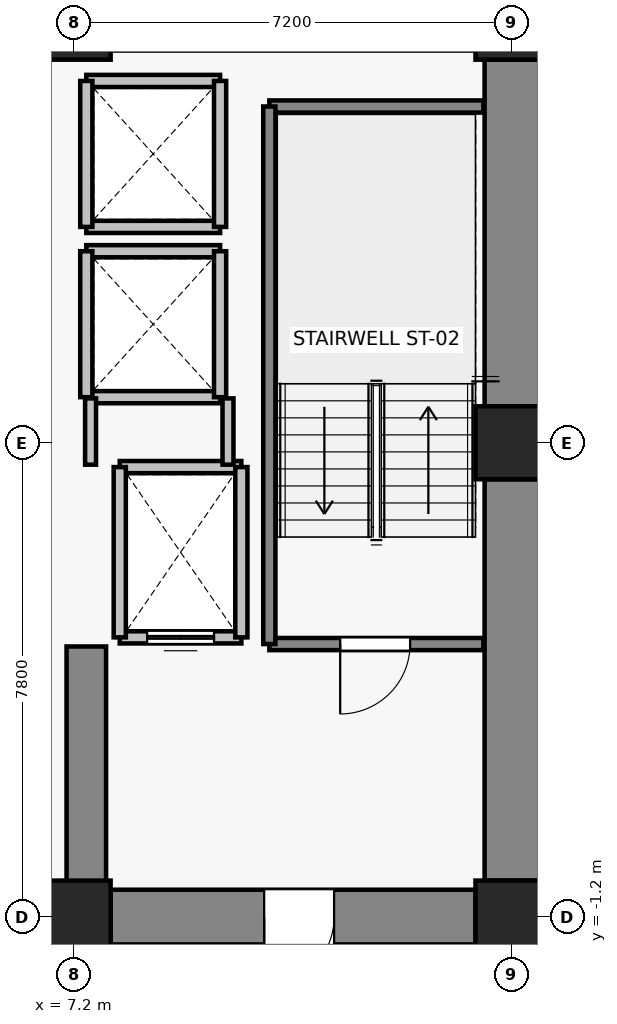
"""IFC4 building model, lengths in metres.
Left out: names, types, materials, properties, quantities, classifications, styles, units other than length and angle.
Written with IfcOpenShell. Run it as: python <this file> out.ifc"""

import sys

from ifc_helpers import new_model, si_unit, direction, frame, frame_2d, origin, origin_2d, place, context, subcontext, project, spatial, rectangle, extrude, source, transform, mapped, element, fill, save


model = new_model("IFC4")
c1 = context("Model", 3, precision=1e-05, world=origin(), true_north=direction((0.0, 1.0)))
c2 = subcontext(c1, "Body", "Model", "MODEL_VIEW")
j1 = project(units=[si_unit("LENGTHUNIT", "METRE"), si_unit("PLANEANGLEUNIT", "RADIAN")], contexts=[c1])
p1 = place(None, origin())
s1 = spatial("IfcSite", under=j1, at=p1, CompositionType="ELEMENT")
p2 = place(p1, origin())
s2 = spatial("IfcBuilding", under=s1, at=p2, CompositionType="ELEMENT")
p3 = place(p2, frame((0.0, 0.0, 70.3)))
s3 = spatial("IfcBuildingStorey", under=s2, at=p3, CompositionType="ELEMENT", Elevation=70.3)
for number, where, z_axis, x_axis in (
    (1, (7.2, -1.2, 0.0), (0.0, 0.0, 1.0), (1.0, 0.0, 0.0)),
    (2, (14.4, -1.2, 0.0), (0.0, 0.0, 1.0), (1.0, 0.0, 0.0)),
    (3, (14.4, 6.6, 0.0), (0.0, 0.0, 1.0), (1.0, 0.0, 0.0)),
    (4, (7.2, 13.5, 0.0), (0.0, 0.0, 1.0), (1.0, 0.0, 0.0)),
    (5, (14.4, 13.5, 0.0), (0.0, 0.0, 1.0), (1.0, 0.0, 0.0)),
):
    element("IfcColumn", number, at=place(p3, frame(where, z_axis=z_axis, x_axis=x_axis)), inside=s3, PredefinedType="COLUMN", context=c2, shape_type="SweptSolid", body=[
        extrude(rectangle(XDim=1.2, YDim=1.2, at=origin_2d()), origin(), (0.0, 0.0, 1.0), 3.3),
    ])
p4 = place(p3, frame((14.4, -0.6, 0.0), z_axis=(0.0, 0.0, 1.0), x_axis=(0.0, 1.0, 0.0)))
e6 = element("IfcWall", 6, at=p4, inside=s3, PredefinedType="SHEAR", context=c2, shape_type="SweptSolid", body=[
    extrude(rectangle(XDim=6.6, YDim=0.9, at=frame_2d((3.3, 0.0))), origin(), (0.0, 0.0, 1.0), 3.075),
])
p5 = place(p3, frame((14.4, 7.2, 0.0), z_axis=(0.0, 0.0, 1.0), x_axis=(0.0, 1.0, 0.0)))
e7 = element("IfcWall", 7, at=p5, inside=s3, PredefinedType="SHEAR", context=c2, shape_type="SweptSolid", body=[
    extrude(rectangle(XDim=5.7, YDim=0.9, at=frame_2d((2.85, 0.0))), origin(), (0.0, 0.0, 1.0), 3.075),
])
p6 = place(p3, frame((13.8, -1.2, 0.0), z_axis=(0.0, 0.0, 1.0), x_axis=(-1.0, 0.0, 0.0)))
e8 = element("IfcWall", 8, at=p6, inside=s3, PredefinedType="SHEAR", context=c2, shape_type="SweptSolid", body=[
    extrude(rectangle(XDim=6.0, YDim=0.9, at=frame_2d((3.0, 0.0))), origin(), (0.0, 0.0, 1.0), 3.075),
])
p7 = place(p6, frame((2.325, 0.0, 0.0)))
e9 = element("IfcOpeningElement", 9, at=p7, cuts=e8, PredefinedType="OPENING", context=c2, shape_type="SweptSolid", body=[
    extrude(rectangle(XDim=1.15, YDim=2.15, at=frame_2d((0.575, 1.075))), frame((0.0, 0.46, 0.0), z_axis=(0.0, -1.0, 0.0), x_axis=(1.0, 0.0, 0.0)), (0.0, 0.0, 1.0), 0.92),
])
p8 = place(p3, frame((7.4, -0.75, 0.0), z_axis=(0.0, 0.0, 1.0), x_axis=(0.0, 1.0, 0.0)))
e10 = element("IfcWall", 10, at=p8, inside=s3, PredefinedType="SHEAR", context=c2, shape_type="SweptSolid", body=[
    extrude(rectangle(XDim=4.0, YDim=0.65, at=frame_2d((2.0, 0.0))), origin(), (0.0, 0.0, 1.0), 3.075),
])
p9 = place(p3, frame((9.95, 3.4, 0.0), z_axis=(0.0, 0.0, 1.0), x_axis=(-1.0, 0.0, 0.0)))
e11 = element("IfcWall", 11, at=p9, inside=s3, PredefinedType="SOLIDWALL", context=c2, shape_type="SweptSolid", body=[
    extrude(rectangle(XDim=2.0, YDim=0.2, at=frame_2d((1.0, 0.0))), origin(), (0.0, 0.0, 1.0), 3.075),
])
p10 = place(p9, frame((0.45, 0.0, 0.0)))
e12 = element("IfcOpeningElement", 12, at=p10, cuts=e11, PredefinedType="OPENING", context=c2, shape_type="SweptSolid", body=[
    extrude(rectangle(XDim=1.1, YDim=2.2, at=frame_2d((0.55, 1.1))), frame((0.0, 0.11, 0.0), z_axis=(0.0, -1.0, 0.0), x_axis=(1.0, 0.0, 0.0)), (0.0, 0.0, 1.0), 0.22),
])
p11 = place(p3, frame((7.95, 6.2, 0.0), z_axis=(0.0, 0.0, 1.0), x_axis=(1.0, 0.0, 0.0)))
e13 = element("IfcWall", 13, at=p11, inside=s3, PredefinedType="SOLIDWALL", context=c2, shape_type="SweptSolid", body=[
    extrude(rectangle(XDim=2.0, YDim=0.2, at=frame_2d((1.0, 0.0))), origin(), (0.0, 0.0, 1.0), 3.075),
])
for number, where, z_axis, x_axis in (
    (14, (7.95, 3.4, 0.0), (0.0, 0.0, 1.0), (0.0, 1.0, 0.0)),
    (15, (9.95, 6.2, 0.0), (0.0, 0.0, 1.0), (0.0, -1.0, 0.0)),
):
    element("IfcWall", number, at=place(p3, frame(where, z_axis=z_axis, x_axis=x_axis)), inside=s3, PredefinedType="SOLIDWALL", context=c2, shape_type="SweptSolid", body=[
        extrude(rectangle(XDim=2.8, YDim=0.2, at=frame_2d((1.4, 0.0))), origin(), (0.0, 0.0, 1.0), 3.075),
    ])
for number, where, z_axis, x_axis in (
    (16, (9.6, 7.35, 0.0), (0.0, 0.0, 1.0), (-1.0, 0.0, 0.0)),
    (17, (7.4, 9.75, 0.0), (0.0, 0.0, 1.0), (1.0, 0.0, 0.0)),
):
    element("IfcWall", number, at=place(p3, frame(where, z_axis=z_axis, x_axis=x_axis)), inside=s3, PredefinedType="SOLIDWALL", context=c2, shape_type="SweptSolid", body=[
        extrude(rectangle(XDim=2.2, YDim=0.2, at=frame_2d((1.1, 0.0))), origin(), (0.0, 0.0, 1.0), 2.465),
    ])
p12 = place(p3, frame((7.4, 7.35, 0.0), z_axis=(0.0, 0.0, 1.0), x_axis=(0.0, 1.0, 0.0)))
e18 = element("IfcWall", 18, at=p12, inside=s3, PredefinedType="SOLIDWALL", context=c2, shape_type="SweptSolid", body=[
    extrude(rectangle(XDim=2.4, YDim=0.2, at=frame_2d((1.2, 0.0))), origin(), (0.0, 0.0, 1.0), 2.465),
])
p13 = place(p3, frame((9.6, 9.75, 0.0), z_axis=(0.0, 0.0, 1.0), x_axis=(0.0, -1.0, 0.0)))
e19 = element("IfcWall", 19, at=p13, inside=s3, PredefinedType="SOLIDWALL", context=c2, shape_type="SweptSolid", body=[
    extrude(rectangle(XDim=2.4, YDim=0.2, at=frame_2d((1.2, 0.0))), origin(), (0.0, 0.0, 1.0), 3.075),
])
for number, where, z_axis, x_axis in (
    (20, (9.6, 10.15, 0.0), (0.0, 0.0, 1.0), (-1.0, 0.0, 0.0)),
    (21, (7.4, 12.55, 0.0), (0.0, 0.0, 1.0), (1.0, 0.0, 0.0)),
):
    element("IfcWall", number, at=place(p3, frame(where, z_axis=z_axis, x_axis=x_axis)), inside=s3, PredefinedType="SOLIDWALL", context=c2, shape_type="SweptSolid", body=[
        extrude(rectangle(XDim=2.2, YDim=0.2, at=frame_2d((1.1, 0.0))), origin(), (0.0, 0.0, 1.0), 2.465),
    ])
p14 = place(p3, frame((7.4, 10.15, 0.0), z_axis=(0.0, 0.0, 1.0), x_axis=(0.0, 1.0, 0.0)))
e22 = element("IfcWall", 22, at=p14, inside=s3, PredefinedType="SOLIDWALL", context=c2, shape_type="SweptSolid", body=[
    extrude(rectangle(XDim=2.4, YDim=0.2, at=frame_2d((1.2, 0.0))), origin(), (0.0, 0.0, 1.0), 2.465),
])
p15 = place(p3, frame((9.6, 12.55, 0.0), z_axis=(0.0, 0.0, 1.0), x_axis=(0.0, -1.0, 0.0)))
e23 = element("IfcWall", 23, at=p15, inside=s3, PredefinedType="SOLIDWALL", context=c2, shape_type="SweptSolid", body=[
    extrude(rectangle(XDim=2.4, YDim=0.2, at=frame_2d((1.2, 0.0))), origin(), (0.0, 0.0, 1.0), 3.075),
])
p16 = place(p3, frame((13.93, 3.29, 0.0), z_axis=(0.0, 0.0, 1.0), x_axis=(-1.0, 0.0, 0.0)))
e24 = element("IfcWall", 24, at=p16, inside=s3, PredefinedType="SOLIDWALL", context=c2, shape_type="SweptSolid", body=[
    extrude(rectangle(XDim=3.52, YDim=0.2, at=frame_2d((1.76, 0.0))), origin(), (0.0, 0.0, 1.0), 3.075),
])
p17 = place(p16, frame((1.205, 0.0, 0.0)))
e25 = element("IfcOpeningElement", 25, at=p17, cuts=e24, PredefinedType="OPENING", context=c2, shape_type="SweptSolid", body=[
    extrude(rectangle(XDim=1.15, YDim=2.15, at=frame_2d((0.575, 1.075))), frame((0.0, 0.11, 0.0), z_axis=(0.0, -1.0, 0.0), x_axis=(1.0, 0.0, 0.0)), (0.0, 0.0, 1.0), 0.22),
])
p18 = place(p3, frame((10.41, 12.13, 0.0), z_axis=(0.0, 0.0, 1.0), x_axis=(1.0, 0.0, 0.0)))
e26 = element("IfcWall", 26, at=p18, inside=s3, PredefinedType="SOLIDWALL", context=c2, shape_type="SweptSolid", body=[
    extrude(rectangle(XDim=3.52, YDim=0.2, at=frame_2d((1.76, 0.0))), origin(), (0.0, 0.0, 1.0), 3.075),
])
p19 = place(p3, frame((10.41, 3.29, 0.0), z_axis=(0.0, 0.0, 1.0), x_axis=(0.0, 1.0, 0.0)))
e27 = element("IfcWall", 27, at=p19, inside=s3, PredefinedType="SOLIDWALL", context=c2, shape_type="SweptSolid", body=[
    extrude(rectangle(XDim=8.84, YDim=0.2, at=frame_2d((4.42, 0.0))), origin(), (0.0, 0.0, 1.0), 3.075),
])
p20 = place(p3, frame((7.47, 6.24, 0.0), z_axis=(0.0, 0.0, 1.0), x_axis=(0.0, 1.0, 0.0)))
e28 = element("IfcWall", 28, at=p20, inside=s3, PredefinedType="PARTITIONING", context=c2, shape_type="SweptSolid", body=[
    extrude(rectangle(XDim=1.09, YDim=0.18, at=frame_2d((0.545, 0.0))), origin(), (0.0, 0.0, 1.0), 2.465),
])
p21 = place(p3, frame((9.73, 7.33, 0.0), z_axis=(0.0, 0.0, 1.0), x_axis=(0.0, -1.0, 0.0)))
e29 = element("IfcWall", 29, at=p21, inside=s3, PredefinedType="PARTITIONING", context=c2, shape_type="SweptSolid", body=[
    extrude(rectangle(XDim=1.09, YDim=0.18, at=frame_2d((0.545, 0.0))), origin(), (0.0, 0.0, 1.0), 3.075),
])
m1 = source(origin(), c2, "Body", "SweptSolid", [
    extrude(rectangle(XDim=1.1, YDim=2.2, at=frame_2d((0.55, 1.1))), frame((0.0, 0.025, 0.0), z_axis=(0.0, -1.0, 0.0), x_axis=(1.0, 0.0, 0.0)), (0.0, 0.0, 1.0), 0.05),
])
p22 = place(p10, origin())
e30 = element("IfcDoor", 30, at=p22, inside=s3, OperationType="DOUBLE_DOOR_SLIDING", PredefinedType="DOOR", context=c2, shape_type="MappedRepresentation", body=[
    mapped(m1, transform((0.0, 0.0, 0.0), x_axis=(1.0, 0.0, 0.0), y_axis=(0.0, 1.0, 0.0), z_axis=(0.0, 0.0, 1.0), scale=1.0)),
])
fill(e12, e30)
m2 = source(origin(), c2, "Body", "SweptSolid", [
    extrude(rectangle(XDim=1.15, YDim=2.15, at=frame_2d((0.575, 1.075))), frame((0.0, 0.025, 0.0), z_axis=(0.0, -1.0, 0.0), x_axis=(1.0, 0.0, 0.0)), (0.0, 0.0, 1.0), 0.05),
])
p23 = place(p17, origin())
e31 = element("IfcDoor", 31, at=p23, inside=s3, OperationType="SINGLE_SWING_RIGHT", PredefinedType="DOOR", context=c2, shape_type="MappedRepresentation", body=[
    mapped(m2, transform((0.0, 0.0, 0.0), x_axis=(1.0, 0.0, 0.0), y_axis=(0.0, 1.0, 0.0), z_axis=(0.0, 0.0, 1.0), scale=1.0)),
])
fill(e25, e31)
p24 = place(p7, origin())
e32 = element("IfcDoor", 32, at=p24, inside=s3, OperationType="SINGLE_SWING_RIGHT", PredefinedType="DOOR", context=c2, shape_type="MappedRepresentation", body=[
    mapped(m2, transform((0.0, 0.0, 0.0), x_axis=(1.0, 0.0, 0.0), y_axis=(0.0, 1.0, 0.0), z_axis=(0.0, 0.0, 1.0), scale=1.0)),
])
fill(e9, e32)
save(model, sys.argv[1])
